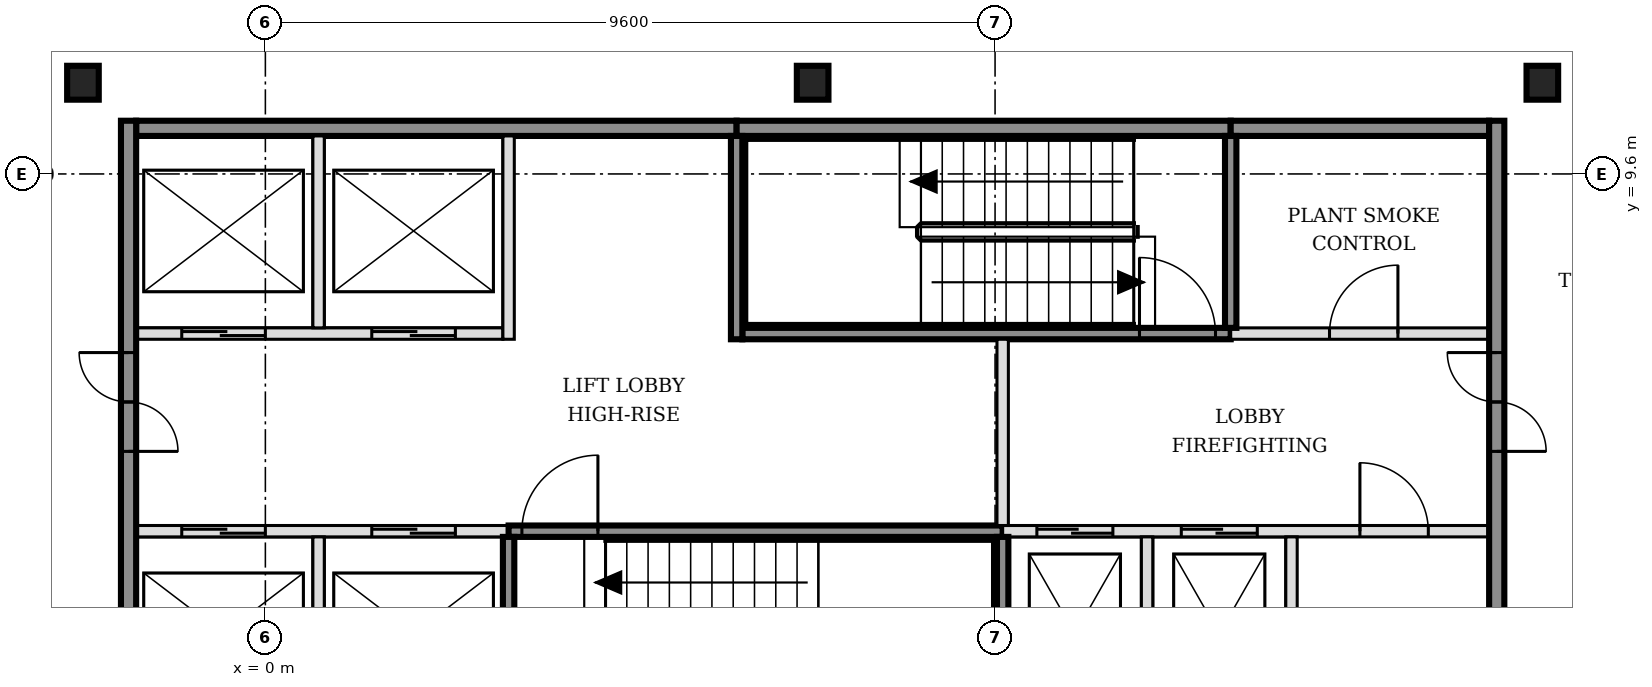
"""IFC4 building model, lengths in metres.
Left out: names, types, materials, properties, quantities, classifications, styles, units other than length and angle.
Written with IfcOpenShell. Run it as: python <this file> out.ifc"""

import sys

from ifc_helpers import new_model, si_unit, direction, frame, frame_2d, origin, origin_2d, place, context, subcontext, project, spatial, rectangle, i_section, extrude, element, fill, save


model = new_model("IFC4")
c1 = context("Model", 3, precision=1e-05, world=origin(), true_north=direction((0.0, 1.0)))
c2 = subcontext(c1, "Body", "Model", "MODEL_VIEW")
j1 = project(units=[si_unit("LENGTHUNIT", "METRE"), si_unit("PLANEANGLEUNIT", "RADIAN")], contexts=[c1])
p1 = place(None, origin())
s1 = spatial("IfcSite", under=j1, at=p1, CompositionType="ELEMENT")
p2 = place(p1, origin())
s2 = spatial("IfcBuilding", under=s1, at=p2, CompositionType="ELEMENT")
p3 = place(p2, frame((0.0, 0.0, 150.6)))
s3 = spatial("IfcBuildingStorey", under=s2, at=p3, CompositionType="ELEMENT", Elevation=150.6)
for number, where, z_axis, x_axis in (
    (1, (-2.4, 10.8, -0.15), (0.0, 0.0, 1.0), (1.0, 0.0, 0.0)),
    (2, (7.2, 10.8, -0.15), (0.0, 0.0, 1.0), (1.0, 0.0, 0.0)),
    (3, (16.8, 10.8, -0.15), (0.0, 0.0, 1.0), (1.0, 0.0, 0.0)),
):
    element("IfcColumn", number, at=place(p3, frame(where, z_axis=z_axis, x_axis=x_axis)), inside=s3, PredefinedType="COLUMN", context=c2, shape_type="SweptSolid", body=[
        extrude(i_section(OverallWidth=0.416, OverallDepth=0.446, WebThickness=0.039, FlangeThickness=0.063, FilletRadius=0.015, at=origin_2d()), origin(), (0.0, 0.0, 1.0), 3.6),
    ])
p4 = place(p3, frame((-1.7, 4.9, 0.0), z_axis=(0.0, 0.0, 1.0), x_axis=(1.0, 0.0, 0.0)))
e4 = element("IfcWall", 4, at=p4, inside=s3, PredefinedType="SOLIDWALL", context=c2, shape_type="SweptSolid", body=[
    extrude(rectangle(XDim=4.9, YDim=0.15, at=frame_2d((2.45, 0.0))), origin(), (0.0, 0.0, 1.0), 3.45),
])
p5 = place(p4, frame((0.6, 0.0, 0.0)))
e5 = element("IfcOpeningElement", 5, at=p5, cuts=e4, PredefinedType="OPENING", context=c2, shape_type="SweptSolid", body=[
    extrude(rectangle(XDim=1.1, YDim=2.1, at=frame_2d((0.55, 1.05))), frame((0.0, 0.085, 0.0), z_axis=(0.0, -1.0, 0.0), x_axis=(1.0, 0.0, 0.0)), (0.0, 0.0, 1.0), 0.17),
])
p6 = place(p4, frame((3.1, 0.0, 0.0)))
e6 = element("IfcOpeningElement", 6, at=p6, cuts=e4, PredefinedType="OPENING", context=c2, shape_type="SweptSolid", body=[
    extrude(rectangle(XDim=1.1, YDim=2.1, at=frame_2d((0.55, 1.05))), frame((0.0, 0.085, 0.0), z_axis=(0.0, -1.0, 0.0), x_axis=(1.0, 0.0, 0.0)), (0.0, 0.0, 1.0), 0.17),
])
p7 = place(p3, frame((3.2, 4.9, 0.0), z_axis=(0.0, 0.0, 1.0), x_axis=(1.0, 0.0, 0.0)))
e7 = element("IfcWall", 7, at=p7, inside=s3, PredefinedType="SOLIDWALL", context=c2, shape_type="SweptSolid", body=[
    extrude(rectangle(XDim=6.5, YDim=0.15, at=frame_2d((3.25, 0.0))), origin(), (0.0, 0.0, 1.0), 3.45),
])
p8 = place(p7, frame((0.175, 0.0, 0.0)))
e8 = element("IfcOpeningElement", 8, at=p8, cuts=e7, PredefinedType="OPENING", context=c2, shape_type="SweptSolid", body=[
    extrude(rectangle(XDim=1.0, YDim=2.1, at=frame_2d((0.5, 1.05))), frame((0.0, 0.085, 0.0), z_axis=(0.0, -1.0, 0.0), x_axis=(1.0, 0.0, 0.0)), (0.0, 0.0, 1.0), 0.17),
])
p9 = place(p3, frame((9.7, 4.9, 0.0), z_axis=(0.0, 0.0, 1.0), x_axis=(1.0, 0.0, 0.0)))
e9 = element("IfcWall", 9, at=p9, inside=s3, PredefinedType="SOLIDWALL", context=c2, shape_type="SweptSolid", body=[
    extrude(rectangle(XDim=6.4, YDim=0.15, at=frame_2d((3.2, 0.0))), origin(), (0.0, 0.0, 1.0), 3.45),
])
p10 = place(p9, frame((0.45, 0.0, 0.0)))
e10 = element("IfcOpeningElement", 10, at=p10, cuts=e9, PredefinedType="OPENING", context=c2, shape_type="SweptSolid", body=[
    extrude(rectangle(XDim=1.0, YDim=2.1, at=frame_2d((0.5, 1.05))), frame((0.0, 0.085, 0.0), z_axis=(0.0, -1.0, 0.0), x_axis=(1.0, 0.0, 0.0)), (0.0, 0.0, 1.0), 0.17),
])
p11 = place(p9, frame((2.35, 0.0, 0.0)))
e11 = element("IfcOpeningElement", 11, at=p11, cuts=e9, PredefinedType="OPENING", context=c2, shape_type="SweptSolid", body=[
    extrude(rectangle(XDim=1.0, YDim=2.1, at=frame_2d((0.5, 1.05))), frame((0.0, 0.085, 0.0), z_axis=(0.0, -1.0, 0.0), x_axis=(1.0, 0.0, 0.0)), (0.0, 0.0, 1.0), 0.17),
])
p12 = place(p9, frame((4.7, 0.0, 0.0)))
e12 = element("IfcOpeningElement", 12, at=p12, cuts=e9, PredefinedType="OPENING", context=c2, shape_type="SweptSolid", body=[
    extrude(rectangle(XDim=0.9, YDim=2.1, at=frame_2d((0.45, 1.05))), frame((0.0, 0.085, 0.0), z_axis=(0.0, -1.0, 0.0), x_axis=(1.0, 0.0, 0.0)), (0.0, 0.0, 1.0), 0.17),
])
p13 = place(p3, frame((-1.7, 7.5, 0.0), z_axis=(0.0, 0.0, 1.0), x_axis=(1.0, 0.0, 0.0)))
e13 = element("IfcWall", 13, at=p13, inside=s3, PredefinedType="SOLIDWALL", context=c2, shape_type="SweptSolid", body=[
    extrude(rectangle(XDim=4.825, YDim=0.15, at=frame_2d((2.413, 0.0))), origin(), (0.0, 0.0, 1.0), 3.45),
])
p14 = place(p13, frame((0.6, 0.0, 0.0)))
e14 = element("IfcOpeningElement", 14, at=p14, cuts=e13, PredefinedType="OPENING", context=c2, shape_type="SweptSolid", body=[
    extrude(rectangle(XDim=1.1, YDim=2.1, at=frame_2d((0.55, 1.05))), frame((0.0, 0.085, 0.0), z_axis=(0.0, -1.0, 0.0), x_axis=(1.0, 0.0, 0.0)), (0.0, 0.0, 1.0), 0.17),
])
p15 = place(p13, frame((3.1, 0.0, 0.0)))
e15 = element("IfcOpeningElement", 15, at=p15, cuts=e13, PredefinedType="OPENING", context=c2, shape_type="SweptSolid", body=[
    extrude(rectangle(XDim=1.1, YDim=2.1, at=frame_2d((0.55, 1.05))), frame((0.0, 0.085, 0.0), z_axis=(0.0, -1.0, 0.0), x_axis=(1.0, 0.0, 0.0)), (0.0, 0.0, 1.0), 0.17),
])
p16 = place(p3, frame((6.275, 7.5, 0.0), z_axis=(0.0, 0.0, 1.0), x_axis=(1.0, 0.0, 0.0)))
e16 = element("IfcWall", 16, at=p16, inside=s3, PredefinedType="SOLIDWALL", context=c2, shape_type="SweptSolid", body=[
    extrude(rectangle(XDim=6.425, YDim=0.15, at=frame_2d((3.212, 0.0))), origin(), (0.0, 0.0, 1.0), 3.45),
])
p17 = place(p16, frame((5.225, 0.0, 0.0)))
e17 = element("IfcOpeningElement", 17, at=p17, cuts=e16, PredefinedType="OPENING", context=c2, shape_type="SweptSolid", body=[
    extrude(rectangle(XDim=1.0, YDim=2.1, at=frame_2d((0.5, 1.05))), frame((0.0, 0.085, 0.0), z_axis=(0.0, -1.0, 0.0), x_axis=(1.0, 0.0, 0.0)), (0.0, 0.0, 1.0), 0.17),
])
p18 = place(p3, frame((12.7, 7.5, 0.0), z_axis=(0.0, 0.0, 1.0), x_axis=(1.0, 0.0, 0.0)))
e18 = element("IfcWall", 18, at=p18, inside=s3, PredefinedType="SOLIDWALL", context=c2, shape_type="SweptSolid", body=[
    extrude(rectangle(XDim=3.4, YDim=0.15, at=frame_2d((1.7, 0.0))), origin(), (0.0, 0.0, 1.0), 3.45),
])
p19 = place(p18, frame((1.3, 0.0, 0.0)))
e19 = element("IfcOpeningElement", 19, at=p19, cuts=e18, PredefinedType="OPENING", context=c2, shape_type="SweptSolid", body=[
    extrude(rectangle(XDim=0.9, YDim=2.1, at=frame_2d((0.45, 1.05))), frame((0.0, 0.085, 0.0), z_axis=(0.0, -1.0, 0.0), x_axis=(1.0, 0.0, 0.0)), (0.0, 0.0, 1.0), 0.17),
])
p20 = place(p3, frame((-1.7, 10.2, 0.0), z_axis=(0.0, 0.0, 1.0), x_axis=(1.0, 0.0, 0.0)))
e20 = element("IfcWall", 20, at=p20, inside=s3, PredefinedType="SOLIDWALL", context=c2, shape_type="SweptSolid", body=[
    extrude(rectangle(XDim=7.9, YDim=0.2, at=frame_2d((3.95, 0.0))), origin(), (0.0, 0.0, 1.0), 3.45),
])
p21 = place(p3, frame((6.2, 10.2, 0.0), z_axis=(0.0, 0.0, 1.0), x_axis=(1.0, 0.0, 0.0)))
e21 = element("IfcWall", 21, at=p21, inside=s3, PredefinedType="SOLIDWALL", context=c2, shape_type="SweptSolid", body=[
    extrude(rectangle(XDim=6.5, YDim=0.2, at=frame_2d((3.25, 0.0))), origin(), (0.0, 0.0, 1.0), 3.45),
])
p22 = place(p3, frame((12.7, 10.2, 0.0), z_axis=(0.0, 0.0, 1.0), x_axis=(1.0, 0.0, 0.0)))
e22 = element("IfcWall", 22, at=p22, inside=s3, PredefinedType="SOLIDWALL", context=c2, shape_type="SweptSolid", body=[
    extrude(rectangle(XDim=3.4, YDim=0.2, at=frame_2d((1.7, 0.0))), origin(), (0.0, 0.0, 1.0), 3.45),
])
p23 = place(p3, frame((-1.8, -5.5, 0.0), z_axis=(0.0, 0.0, 1.0), x_axis=(0.0, 1.0, 0.0)))
e23 = element("IfcWall", 23, at=p23, inside=s3, PredefinedType="SOLIDWALL", context=c2, shape_type="SweptSolid", body=[
    extrude(rectangle(XDim=15.8, YDim=0.2, at=frame_2d((7.9, 0.0))), origin(), (0.0, 0.0, 1.0), 3.45),
])
p24 = place(p23, frame((3.05, 0.0, 0.0)))
e24 = element("IfcOpeningElement", 24, at=p24, cuts=e23, PredefinedType="OPENING", context=c2, shape_type="SweptSolid", body=[
    extrude(rectangle(XDim=1.3, YDim=2.1, at=frame_2d((0.65, 1.05))), frame((0.0, 0.11, 0.0), z_axis=(0.0, -1.0, 0.0), x_axis=(1.0, 0.0, 0.0)), (0.0, 0.0, 1.0), 0.22),
])
p25 = place(p23, frame((11.45, 0.0, 0.0)))
e25 = element("IfcOpeningElement", 25, at=p25, cuts=e23, PredefinedType="OPENING", context=c2, shape_type="SweptSolid", body=[
    extrude(rectangle(XDim=1.3, YDim=2.1, at=frame_2d((0.65, 1.05))), frame((0.0, 0.11, 0.0), z_axis=(0.0, -1.0, 0.0), x_axis=(1.0, 0.0, 0.0)), (0.0, 0.0, 1.0), 0.22),
])
p26 = place(p3, frame((0.7, 2.275, 0.0), z_axis=(0.0, 0.0, 1.0), x_axis=(0.0, 1.0, 0.0)))
e26 = element("IfcWall", 26, at=p26, inside=s3, PredefinedType="SOLIDWALL", context=c2, shape_type="SweptSolid", body=[
    extrude(rectangle(XDim=2.55, YDim=0.15, at=frame_2d((1.275, 0.0))), origin(), (0.0, 0.0, 1.0), 3.45),
])
p27 = place(p3, frame((0.7, 7.575, 0.0), z_axis=(0.0, 0.0, 1.0), x_axis=(0.0, 1.0, 0.0)))
e27 = element("IfcWall", 27, at=p27, inside=s3, PredefinedType="SOLIDWALL", context=c2, shape_type="SweptSolid", body=[
    extrude(rectangle(XDim=2.525, YDim=0.15, at=frame_2d((1.263, 0.0))), origin(), (0.0, 0.0, 1.0), 3.45),
])
p28 = place(p3, frame((3.2, 2.275, 0.0), z_axis=(0.0, 0.0, 1.0), x_axis=(0.0, 1.0, 0.0)))
e28 = element("IfcWall", 28, at=p28, inside=s3, PredefinedType="SOLIDWALL", context=c2, shape_type="SweptSolid", body=[
    extrude(rectangle(XDim=2.55, YDim=0.15, at=frame_2d((1.275, 0.0))), origin(), (0.0, 0.0, 1.0), 3.45),
])
for number, where, z_axis, x_axis in (
    (29, (3.2, 7.425, 0.0), (0.0, 0.0, 1.0), (0.0, 1.0, 0.0)),
    (30, (6.2, 7.425, 0.0), (0.0, 0.0, 1.0), (0.0, 1.0, 0.0)),
):
    element("IfcWall", number, at=place(p3, frame(where, z_axis=z_axis, x_axis=x_axis)), inside=s3, PredefinedType="SOLIDWALL", context=c2, shape_type="SweptSolid", body=[
        extrude(rectangle(XDim=2.675, YDim=0.15, at=frame_2d((1.337, 0.0))), origin(), (0.0, 0.0, 1.0), 3.45),
    ])
p29 = place(p3, frame((9.7, 2.275, 0.0), z_axis=(0.0, 0.0, 1.0), x_axis=(0.0, 1.0, 0.0)))
e31 = element("IfcWall", 31, at=p29, inside=s3, PredefinedType="SOLIDWALL", context=c2, shape_type="SweptSolid", body=[
    extrude(rectangle(XDim=2.55, YDim=0.15, at=frame_2d((1.275, 0.0))), origin(), (0.0, 0.0, 1.0), 3.45),
])
p30 = place(p3, frame((9.7, 4.975, 0.0), z_axis=(0.0, 0.0, 1.0), x_axis=(0.0, 1.0, 0.0)))
e32 = element("IfcWall", 32, at=p30, inside=s3, PredefinedType="SOLIDWALL", context=c2, shape_type="SweptSolid", body=[
    extrude(rectangle(XDim=2.45, YDim=0.15, at=frame_2d((1.225, 0.0))), origin(), (0.0, 0.0, 1.0), 3.45),
])
p31 = place(p3, frame((11.6, 2.275, 0.0), z_axis=(0.0, 0.0, 1.0), x_axis=(0.0, 1.0, 0.0)))
e33 = element("IfcWall", 33, at=p31, inside=s3, PredefinedType="SOLIDWALL", context=c2, shape_type="SweptSolid", body=[
    extrude(rectangle(XDim=2.55, YDim=0.15, at=frame_2d((1.275, 0.0))), origin(), (0.0, 0.0, 1.0), 3.45),
])
p32 = place(p3, frame((12.7, 7.575, 0.0), z_axis=(0.0, 0.0, 1.0), x_axis=(0.0, 1.0, 0.0)))
e34 = element("IfcWall", 34, at=p32, inside=s3, PredefinedType="SOLIDWALL", context=c2, shape_type="SweptSolid", body=[
    extrude(rectangle(XDim=2.525, YDim=0.15, at=frame_2d((1.263, 0.0))), origin(), (0.0, 0.0, 1.0), 3.45),
])
p33 = place(p3, frame((13.5, 2.275, 0.0), z_axis=(0.0, 0.0, 1.0), x_axis=(0.0, 1.0, 0.0)))
e35 = element("IfcWall", 35, at=p33, inside=s3, PredefinedType="SOLIDWALL", context=c2, shape_type="SweptSolid", body=[
    extrude(rectangle(XDim=2.55, YDim=0.15, at=frame_2d((1.275, 0.0))), origin(), (0.0, 0.0, 1.0), 3.45),
])
p34 = place(p3, frame((16.2, -5.5, 0.0), z_axis=(0.0, 0.0, 1.0), x_axis=(0.0, 1.0, 0.0)))
e36 = element("IfcWall", 36, at=p34, inside=s3, PredefinedType="SOLIDWALL", context=c2, shape_type="SweptSolid", body=[
    extrude(rectangle(XDim=15.8, YDim=0.2, at=frame_2d((7.9, 0.0))), origin(), (0.0, 0.0, 1.0), 3.45),
])
p35 = place(p34, frame((3.05, 0.0, 0.0)))
e37 = element("IfcOpeningElement", 37, at=p35, cuts=e36, PredefinedType="OPENING", context=c2, shape_type="SweptSolid", body=[
    extrude(rectangle(XDim=1.3, YDim=2.1, at=frame_2d((0.65, 1.05))), frame((0.0, 0.11, 0.0), z_axis=(0.0, -1.0, 0.0), x_axis=(1.0, 0.0, 0.0)), (0.0, 0.0, 1.0), 0.22),
])
p36 = place(p34, frame((11.45, 0.0, 0.0)))
e38 = element("IfcOpeningElement", 38, at=p36, cuts=e36, PredefinedType="OPENING", context=c2, shape_type="SweptSolid", body=[
    extrude(rectangle(XDim=1.3, YDim=2.1, at=frame_2d((0.65, 1.05))), frame((0.0, 0.11, 0.0), z_axis=(0.0, -1.0, 0.0), x_axis=(1.0, 0.0, 0.0)), (0.0, 0.0, 1.0), 0.22),
])
p37 = place(p3, frame((-12.075, 9.319, 0.0), z_axis=(0.0, 0.0, 1.0), x_axis=(0.707106781187, 0.707106781187, 0.0)))
e39 = element("IfcWall", 39, at=p37, inside=s3, PredefinedType="PARTITIONING", context=c2, shape_type="SweptSolid", body=[
    extrude(rectangle(XDim=13.793, YDim=0.15, at=frame_2d((6.896, 0.0))), origin(), (0.0, 0.0, 1.0), 2.73),
])
p38 = place(p37, frame((11.692, 0.0, 0.0)))
e40 = element("IfcOpeningElement", 40, at=p38, cuts=e39, PredefinedType="OPENING", context=c2, shape_type="SweptSolid", body=[
    extrude(rectangle(XDim=0.9, YDim=2.1, at=frame_2d((0.45, 1.05))), frame((0.0, 0.085, 0.0), z_axis=(0.0, -1.0, 0.0), x_axis=(1.0, 0.0, 0.0)), (0.0, 0.0, 1.0), 0.17),
])
p39 = place(p37, frame((7.376, 0.0, 0.0)))
e41 = element("IfcOpeningElement", 41, at=p39, cuts=e39, PredefinedType="OPENING", context=c2, shape_type="SweptSolid", body=[
    extrude(rectangle(XDim=0.9, YDim=2.1, at=frame_2d((0.45, 1.05))), frame((0.0, 0.085, 0.0), z_axis=(0.0, -1.0, 0.0), x_axis=(1.0, 0.0, 0.0)), (0.0, 0.0, 1.0), 0.17),
])
p40 = place(p37, frame((3.62, 0.0, 0.0)))
e42 = element("IfcOpeningElement", 42, at=p40, cuts=e39, PredefinedType="OPENING", context=c2, shape_type="SweptSolid", body=[
    extrude(rectangle(XDim=0.9, YDim=2.1, at=frame_2d((0.45, 1.05))), frame((0.0, 0.085, 0.0), z_axis=(0.0, -1.0, 0.0), x_axis=(1.0, 0.0, 0.0)), (0.0, 0.0, 1.0), 0.17),
])
p41 = place(p3, frame((26.272, 9.522, 0.0), z_axis=(0.0, 0.0, 1.0), x_axis=(-0.707097742657, 0.707115819601, 0.0)))
e43 = element("IfcWall", 43, at=p41, inside=s3, PredefinedType="PARTITIONING", context=c2, shape_type="SweptSolid", body=[
    extrude(rectangle(XDim=13.506, YDim=0.15, at=frame_2d((6.753, 0.0))), origin(), (0.0, 0.0, 1.0), 2.73),
])
p42 = place(p41, frame((1.398, 0.0, 0.0)))
e44 = element("IfcOpeningElement", 44, at=p42, cuts=e43, PredefinedType="OPENING", context=c2, shape_type="SweptSolid", body=[
    extrude(rectangle(XDim=0.9, YDim=2.1, at=frame_2d((0.45, 1.05))), frame((0.0, 0.085, 0.0), z_axis=(0.0, -1.0, 0.0), x_axis=(1.0, 0.0, 0.0)), (0.0, 0.0, 1.0), 0.17),
])
p43 = place(p41, frame((4.668, 0.0, 0.0)))
e45 = element("IfcOpeningElement", 45, at=p43, cuts=e43, PredefinedType="OPENING", context=c2, shape_type="SweptSolid", body=[
    extrude(rectangle(XDim=0.9, YDim=2.1, at=frame_2d((0.45, 1.05))), frame((0.0, 0.085, 0.0), z_axis=(0.0, -1.0, 0.0), x_axis=(1.0, 0.0, 0.0)), (0.0, 0.0, 1.0), 0.17),
])
p44 = place(p41, frame((7.938, 0.0, 0.0)))
e46 = element("IfcOpeningElement", 46, at=p44, cuts=e43, PredefinedType="OPENING", context=c2, shape_type="SweptSolid", body=[
    extrude(rectangle(XDim=0.9, YDim=2.1, at=frame_2d((0.45, 1.05))), frame((0.0, 0.085, 0.0), z_axis=(0.0, -1.0, 0.0), x_axis=(1.0, 0.0, 0.0)), (0.0, 0.0, 1.0), 0.17),
])
p45 = place(p41, frame((11.405, 0.0, 0.0)))
e47 = element("IfcOpeningElement", 47, at=p45, cuts=e43, PredefinedType="OPENING", context=c2, shape_type="SweptSolid", body=[
    extrude(rectangle(XDim=0.9, YDim=2.1, at=frame_2d((0.45, 1.05))), frame((0.0, 0.085, 0.0), z_axis=(0.0, -1.0, 0.0), x_axis=(1.0, 0.0, 0.0)), (0.0, 0.0, 1.0), 0.17),
])
p46 = place(p5, origin())
e48 = element("IfcDoor", 48, at=p46, inside=s3, OperationType="DOUBLE_DOOR_SLIDING", PredefinedType="DOOR", context=c2, shape_type="SweptSolid", body=[
    extrude(rectangle(XDim=1.1, YDim=2.1, at=frame_2d((0.55, 1.05))), frame((0.0, 0.025, 0.0), z_axis=(0.0, -1.0, 0.0), x_axis=(1.0, 0.0, 0.0)), (0.0, 0.0, 1.0), 0.05),
])
fill(e5, e48)
p47 = place(p6, origin())
e49 = element("IfcDoor", 49, at=p47, inside=s3, OperationType="DOUBLE_DOOR_SLIDING", PredefinedType="DOOR", context=c2, shape_type="SweptSolid", body=[
    extrude(rectangle(XDim=1.1, YDim=2.1, at=frame_2d((0.55, 1.05))), frame((0.0, 0.025, 0.0), z_axis=(0.0, -1.0, 0.0), x_axis=(1.0, 0.0, 0.0)), (0.0, 0.0, 1.0), 0.05),
])
fill(e6, e49)
p48 = place(p14, origin())
e50 = element("IfcDoor", 50, at=p48, inside=s3, OperationType="DOUBLE_DOOR_SLIDING", PredefinedType="DOOR", context=c2, shape_type="SweptSolid", body=[
    extrude(rectangle(XDim=1.1, YDim=2.1, at=frame_2d((0.55, 1.05))), frame((0.0, 0.025, 0.0), z_axis=(0.0, -1.0, 0.0), x_axis=(1.0, 0.0, 0.0)), (0.0, 0.0, 1.0), 0.05),
])
fill(e14, e50)
p49 = place(p15, origin())
e51 = element("IfcDoor", 51, at=p49, inside=s3, OperationType="DOUBLE_DOOR_SLIDING", PredefinedType="DOOR", context=c2, shape_type="SweptSolid", body=[
    extrude(rectangle(XDim=1.1, YDim=2.1, at=frame_2d((0.55, 1.05))), frame((0.0, 0.025, 0.0), z_axis=(0.0, -1.0, 0.0), x_axis=(1.0, 0.0, 0.0)), (0.0, 0.0, 1.0), 0.05),
])
fill(e15, e51)
p50 = place(p10, origin())
e52 = element("IfcDoor", 52, at=p50, inside=s3, OperationType="DOUBLE_DOOR_SLIDING", PredefinedType="DOOR", context=c2, shape_type="SweptSolid", body=[
    extrude(rectangle(XDim=1.0, YDim=2.1, at=frame_2d((0.5, 1.05))), frame((0.0, 0.025, 0.0), z_axis=(0.0, -1.0, 0.0), x_axis=(1.0, 0.0, 0.0)), (0.0, 0.0, 1.0), 0.05),
])
fill(e10, e52)
p51 = place(p11, origin())
e53 = element("IfcDoor", 53, at=p51, inside=s3, OperationType="DOUBLE_DOOR_SLIDING", PredefinedType="DOOR", context=c2, shape_type="SweptSolid", body=[
    extrude(rectangle(XDim=1.0, YDim=2.1, at=frame_2d((0.5, 1.05))), frame((0.0, 0.025, 0.0), z_axis=(0.0, -1.0, 0.0), x_axis=(1.0, 0.0, 0.0)), (0.0, 0.0, 1.0), 0.05),
])
fill(e11, e53)
p52 = place(p8, origin())
e54 = element("IfcDoor", 54, at=p52, inside=s3, OperationType="SINGLE_SWING_RIGHT", PredefinedType="DOOR", context=c2, shape_type="SweptSolid", body=[
    extrude(rectangle(XDim=1.0, YDim=2.1, at=frame_2d((0.5, 1.05))), frame((0.0, 0.025, 0.0), z_axis=(0.0, -1.0, 0.0), x_axis=(1.0, 0.0, 0.0)), (0.0, 0.0, 1.0), 0.05),
])
fill(e8, e54)
p53 = place(p17, origin())
e55 = element("IfcDoor", 55, at=p53, inside=s3, OperationType="SINGLE_SWING_LEFT", PredefinedType="DOOR", context=c2, shape_type="SweptSolid", body=[
    extrude(rectangle(XDim=1.0, YDim=2.1, at=frame_2d((0.5, 1.05))), frame((0.0, 0.025, 0.0), z_axis=(0.0, -1.0, 0.0), x_axis=(1.0, 0.0, 0.0)), (0.0, 0.0, 1.0), 0.05),
])
fill(e17, e55)
p54 = place(p25, origin())
e56 = element("IfcDoor", 56, at=p54, inside=s3, OperationType="DOUBLE_DOOR_SINGLE_SWING", PredefinedType="DOOR", context=c2, shape_type="SweptSolid", body=[
    extrude(rectangle(XDim=1.3, YDim=2.1, at=frame_2d((0.65, 1.05))), frame((0.0, 0.025, 0.0), z_axis=(0.0, -1.0, 0.0), x_axis=(1.0, 0.0, 0.0)), (0.0, 0.0, 1.0), 0.05),
])
fill(e25, e56)
p55 = place(p36, origin())
e57 = element("IfcDoor", 57, at=p55, inside=s3, OperationType="DOUBLE_DOOR_SINGLE_SWING", PredefinedType="DOOR", context=c2, shape_type="SweptSolid", body=[
    extrude(rectangle(XDim=1.3, YDim=2.1, at=frame_2d((0.65, 1.05))), frame((0.0, 0.025, 0.0), z_axis=(0.0, -1.0, 0.0), x_axis=(1.0, 0.0, 0.0)), (0.0, 0.0, 1.0), 0.05),
])
fill(e38, e57)
p56 = place(p12, origin())
e58 = element("IfcDoor", 58, at=p56, inside=s3, OperationType="SINGLE_SWING_LEFT", PredefinedType="DOOR", context=c2, shape_type="SweptSolid", body=[
    extrude(rectangle(XDim=0.9, YDim=2.1, at=frame_2d((0.45, 1.05))), frame((0.0, 0.025, 0.0), z_axis=(0.0, -1.0, 0.0), x_axis=(1.0, 0.0, 0.0)), (0.0, 0.0, 1.0), 0.05),
])
fill(e12, e58)
p57 = place(p19, origin())
e59 = element("IfcDoor", 59, at=p57, inside=s3, OperationType="SINGLE_SWING_RIGHT", PredefinedType="DOOR", context=c2, shape_type="SweptSolid", body=[
    extrude(rectangle(XDim=0.9, YDim=2.1, at=frame_2d((0.45, 1.05))), frame((0.0, 0.025, 0.0), z_axis=(0.0, -1.0, 0.0), x_axis=(1.0, 0.0, 0.0)), (0.0, 0.0, 1.0), 0.05),
])
fill(e19, e59)
save(model, sys.argv[1])
